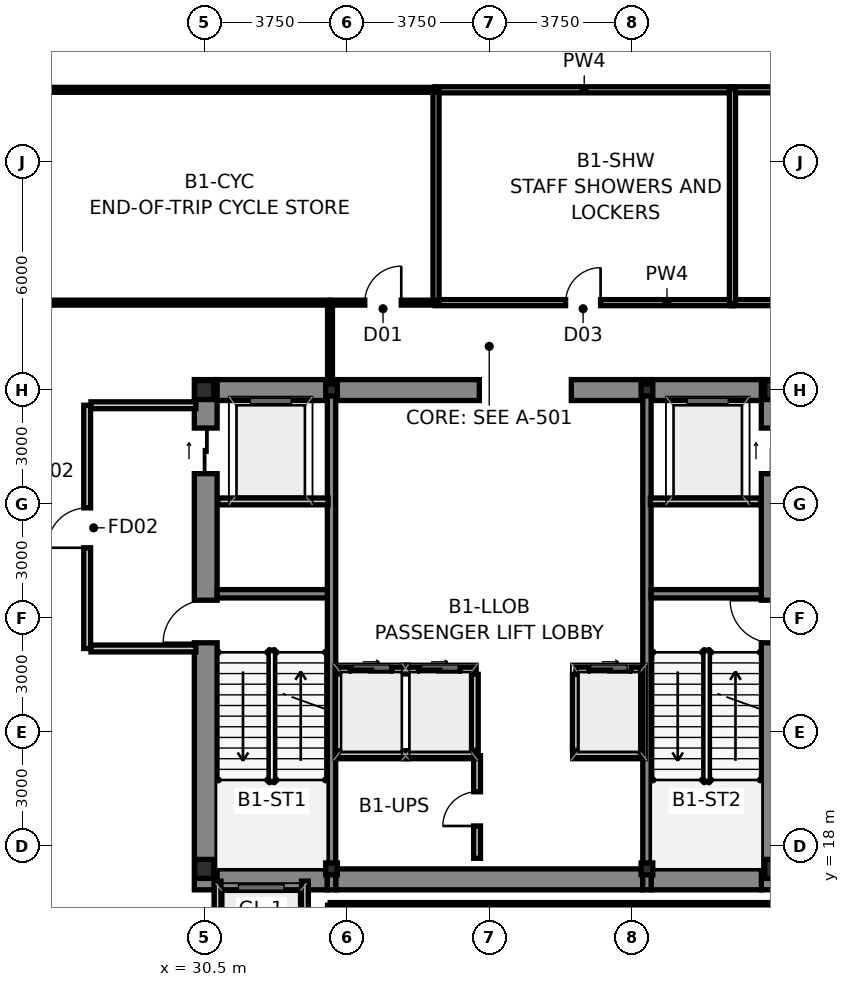
"""IFC4 building model, lengths in metres.
Left out: names, types, materials, properties, quantities, classifications, styles, units other than length and angle.
Written with IfcOpenShell. Run it as: python <this file> out.ifc"""

import sys

from ifc_helpers import new_model, si_unit, direction, frame, frame_2d, origin, origin_2d, place, context, subcontext, project, spatial, rectangle, i_section, extrude, source, transform, mapped, element, fill, save


model = new_model("IFC4")
c1 = context("Model", 3, precision=1e-05, world=origin(), true_north=direction((0.0, 1.0)))
c2 = subcontext(c1, "Body", "Model", "MODEL_VIEW")
j1 = project(units=[si_unit("LENGTHUNIT", "METRE"), si_unit("PLANEANGLEUNIT", "RADIAN")], contexts=[c1])
p1 = place(None, origin())
s1 = spatial("IfcSite", under=j1, at=p1, CompositionType="ELEMENT")
p2 = place(p1, origin())
s2 = spatial("IfcBuilding", under=s1, at=p2, CompositionType="ELEMENT")
p3 = place(p2, frame((0.0, 0.0, -4.8)))
s3 = spatial("IfcBuildingStorey", under=s2, at=p3, CompositionType="ELEMENT", Elevation=-4.8)
m1 = source(origin(), c2, "Body", "SweptSolid", [
    extrude(i_section(OverallWidth=0.5, OverallDepth=0.5, WebThickness=0.028, FlangeThickness=0.04, at=origin_2d()), origin(), (0.0, 0.0, 1.0), 4.8),
])
for number, where, z_axis, x_axis in (
    (1, (30.5, 17.4, 0.0), (0.0, 0.0, 1.0), (1.0, 0.0, 0.0)),
    (2, (45.5, 17.4, 0.0), (0.0, 0.0, 1.0), (1.0, 0.0, 0.0)),
    (3, (45.5, 30.0, 0.0), (0.0, 0.0, 1.0), (1.0, 0.0, 0.0)),
    (4, (30.5, 30.0, 0.0), (0.0, 0.0, 1.0), (1.0, 0.0, 0.0)),
):
    element("IfcColumn", number, at=place(p3, frame(where, z_axis=z_axis, x_axis=x_axis)), inside=s3, PredefinedType="COLUMN", context=c2, shape_type="MappedRepresentation", body=[
        mapped(m1, transform((0.0, 0.0, 0.0), scale=1.0)),
    ])
m2 = source(origin(), c2, "Body", "SweptSolid", [
    extrude(i_section(OverallWidth=0.307, OverallDepth=0.315, WebThickness=0.012, FlangeThickness=0.019, at=origin_2d()), origin(), (0.0, 0.0, 1.0), 4.8),
])
for number, where, z_axis, x_axis in (
    (5, (33.85, 17.4, 0.0), (0.0, 0.0, 1.0), (1.0, 0.0, 0.0)),
    (6, (42.15, 17.4, 0.0), (0.0, 0.0, 1.0), (1.0, 0.0, 0.0)),
    (7, (33.85, 30.0, 0.0), (0.0, 0.0, 1.0), (1.0, 0.0, 0.0)),
    (8, (42.15, 30.0, 0.0), (0.0, 0.0, 1.0), (1.0, 0.0, 0.0)),
):
    element("IfcColumn", number, at=place(p3, frame(where, z_axis=z_axis, x_axis=x_axis)), inside=s3, PredefinedType="COLUMN", context=c2, shape_type="MappedRepresentation", body=[
        mapped(m2, transform((0.0, 0.0, 0.0), scale=1.0)),
    ])
p4 = place(p3, frame((30.54, 16.85, 0.0), z_axis=(0.0, 0.0, 1.0), x_axis=(0.0, 1.0, 0.0)))
e9 = element("IfcWall", 9, at=p4, inside=s3, PredefinedType="SHEAR", context=c2, shape_type="SweptSolid", body=[
    extrude(rectangle(XDim=13.425, YDim=0.6, at=frame_2d((6.712, 0.0))), origin(), (0.0, 0.0, 1.0), 4.8),
])
p5 = place(p4, frame((6.5, 0.0, 0.0)))
e10 = element("IfcOpeningElement", 10, at=p5, cuts=e9, PredefinedType="OPENING", context=c2, shape_type="SweptSolid", body=[
    extrude(rectangle(XDim=1.12, YDim=2.15, at=frame_2d((0.56, 1.075))), frame((0.0, 0.312, 0.0), z_axis=(0.0, -1.0, 0.0), x_axis=(1.0, 0.0, 0.0)), (0.0, 0.0, 1.0), 0.624),
])
p6 = place(p4, frame((10.95, 0.0, 0.0)))
e11 = element("IfcOpeningElement", 11, at=p6, cuts=e9, PredefinedType="OPENING", context=c2, shape_type="SweptSolid", body=[
    extrude(rectangle(XDim=1.2, YDim=2.2, at=frame_2d((0.6, 1.1))), frame((0.0, 0.312, 0.0), z_axis=(0.0, -1.0, 0.0), x_axis=(1.0, 0.0, 0.0)), (0.0, 0.0, 1.0), 0.624),
])
p7 = place(p3, frame((45.46, 16.85, 0.0), z_axis=(0.0, 0.0, 1.0), x_axis=(0.0, 1.0, 0.0)))
e12 = element("IfcWall", 12, at=p7, inside=s3, PredefinedType="SHEAR", context=c2, shape_type="SweptSolid", body=[
    extrude(rectangle(XDim=13.425, YDim=0.6, at=frame_2d((6.712, 0.0))), origin(), (0.0, 0.0, 1.0), 4.8),
])
p8 = place(p7, frame((6.5, 0.0, 0.0)))
e13 = element("IfcOpeningElement", 13, at=p8, cuts=e12, PredefinedType="OPENING", context=c2, shape_type="SweptSolid", body=[
    extrude(rectangle(XDim=1.12, YDim=2.15, at=frame_2d((0.56, 1.075))), frame((0.0, 0.312, 0.0), z_axis=(0.0, -1.0, 0.0), x_axis=(1.0, 0.0, 0.0)), (0.0, 0.0, 1.0), 0.624),
])
p9 = place(p7, frame((10.95, 0.0, 0.0)))
e14 = element("IfcOpeningElement", 14, at=p9, cuts=e12, PredefinedType="OPENING", context=c2, shape_type="SweptSolid", body=[
    extrude(rectangle(XDim=1.2, YDim=2.2, at=frame_2d((0.6, 1.1))), frame((0.0, 0.312, 0.0), z_axis=(0.0, -1.0, 0.0), x_axis=(1.0, 0.0, 0.0)), (0.0, 0.0, 1.0), 0.624),
])
p10 = place(p3, frame((30.84, 17.125, 0.0), z_axis=(0.0, 0.0, 1.0), x_axis=(1.0, 0.0, 0.0)))
e15 = element("IfcWall", 15, at=p10, inside=s3, PredefinedType="SHEAR", context=c2, shape_type="SweptSolid", body=[
    extrude(rectangle(XDim=2.9, YDim=0.55, at=frame_2d((1.45, 0.0))), origin(), (0.0, 0.0, 1.0), 4.8),
])
p11 = place(p3, frame((33.96, 17.125, 0.0), z_axis=(0.0, 0.0, 1.0), x_axis=(1.0, 0.0, 0.0)))
e16 = element("IfcWall", 16, at=p11, inside=s3, PredefinedType="SHEAR", context=c2, shape_type="SweptSolid", body=[
    extrude(rectangle(XDim=8.08, YDim=0.55, at=frame_2d((4.04, 0.0))), origin(), (0.0, 0.0, 1.0), 4.8),
])
for number, where, z_axis, x_axis in (
    (17, (42.26, 17.125, 0.0), (0.0, 0.0, 1.0), (1.0, 0.0, 0.0)),
    (18, (30.84, 30.0, 0.0), (0.0, 0.0, 1.0), (1.0, 0.0, 0.0)),
):
    element("IfcWall", number, at=place(p3, frame(where, z_axis=z_axis, x_axis=x_axis)), inside=s3, PredefinedType="SHEAR", context=c2, shape_type="SweptSolid", body=[
        extrude(rectangle(XDim=2.9, YDim=0.55, at=frame_2d((1.45, 0.0))), origin(), (0.0, 0.0, 1.0), 4.8),
    ])
p12 = place(p3, frame((33.96, 30.0, 0.0), z_axis=(0.0, 0.0, 1.0), x_axis=(1.0, 0.0, 0.0)))
e19 = element("IfcWall", 19, at=p12, inside=s3, PredefinedType="SHEAR", context=c2, shape_type="SweptSolid", body=[
    extrude(rectangle(XDim=3.78, YDim=0.55, at=frame_2d((1.89, 0.0))), origin(), (0.0, 0.0, 1.0), 4.8),
])
p13 = place(p3, frame((40.16, 30.0, 0.0), z_axis=(0.0, 0.0, 1.0), x_axis=(1.0, 0.0, 0.0)))
e20 = element("IfcWall", 20, at=p13, inside=s3, PredefinedType="SHEAR", context=c2, shape_type="SweptSolid", body=[
    extrude(rectangle(XDim=1.88, YDim=0.55, at=frame_2d((0.94, 0.0))), origin(), (0.0, 0.0, 1.0), 4.8),
])
p14 = place(p3, frame((42.26, 30.0, 0.0), z_axis=(0.0, 0.0, 1.0), x_axis=(1.0, 0.0, 0.0)))
e21 = element("IfcWall", 21, at=p14, inside=s3, PredefinedType="SHEAR", context=c2, shape_type="SweptSolid", body=[
    extrude(rectangle(XDim=2.9, YDim=0.55, at=frame_2d((1.45, 0.0))), origin(), (0.0, 0.0, 1.0), 4.8),
])
for number, where, z_axis, x_axis in (
    (22, (33.85, 16.85, 0.0), (0.0, 0.0, 1.0), (0.0, 1.0, 0.0)),
    (23, (42.15, 16.85, 0.0), (0.0, 0.0, 1.0), (0.0, 1.0, 0.0)),
):
    element("IfcWall", number, at=place(p3, frame(where, z_axis=z_axis, x_axis=x_axis)), inside=s3, PredefinedType="SHEAR", context=c2, shape_type="SweptSolid", body=[
        extrude(rectangle(XDim=13.425, YDim=0.22, at=frame_2d((6.712, 0.0))), origin(), (0.0, 0.0, 1.0), 4.8),
    ])
for number, where, z_axis, x_axis in (
    (24, (30.84, 24.64, 0.0), (0.0, 0.0, 1.0), (1.0, 0.0, 0.0)),
    (25, (42.26, 24.64, 0.0), (0.0, 0.0, 1.0), (1.0, 0.0, 0.0)),
):
    element("IfcWall", number, at=place(p3, frame(where, z_axis=z_axis, x_axis=x_axis)), inside=s3, PredefinedType="SHEAR", context=c2, shape_type="SweptSolid", body=[
        extrude(rectangle(XDim=2.9, YDim=0.22, at=frame_2d((1.45, 0.0))), origin(), (0.0, 0.0, 1.0), 4.8),
    ])
p15 = place(p3, frame((30.85, 14.42, 0.0), z_axis=(0.0, 0.0, 1.0), x_axis=(0.0, 1.0, 0.0)))
e26 = element("IfcWall", 26, at=p15, inside=s3, PredefinedType="PARTITIONING", context=c2, shape_type="SweptSolid", body=[
    extrude(rectangle(XDim=2.66, YDim=0.18, at=frame_2d((1.33, 0.0))), origin(), (0.0, 0.0, 1.0), 3.854),
])
p16 = place(p3, frame((33.15, 14.42, 0.0), z_axis=(0.0, 0.0, 1.0), x_axis=(0.0, 1.0, 0.0)))
e27 = element("IfcWall", 27, at=p16, inside=s3, PredefinedType="PARTITIONING", context=c2, shape_type="SweptSolid", body=[
    extrude(rectangle(XDim=2.66, YDim=0.18, at=frame_2d((1.33, 0.0))), origin(), (0.0, 0.0, 1.0), 4.48),
])
p17 = place(p3, frame((34.02, 22.62, 0.0), z_axis=(0.0, 0.0, 1.0), x_axis=(1.0, 0.0, 0.0)))
e28 = element("IfcWall", 28, at=p17, inside=s3, PredefinedType="PARTITIONING", context=c2, shape_type="SweptSolid", body=[
    extrude(rectangle(XDim=3.6, YDim=0.18, at=frame_2d((1.8, 0.0))), origin(), (0.0, 0.0, 1.0), 4.48),
])
p18 = place(p17, frame((0.32, 0.0, 0.0)))
e29 = element("IfcOpeningElement", 29, at=p18, cuts=e28, PredefinedType="OPENING", context=c2, shape_type="SweptSolid", body=[
    extrude(rectangle(XDim=1.1, YDim=2.2, at=frame_2d((0.55, 1.1))), frame((0.0, 0.102, 0.0), z_axis=(0.0, -1.0, 0.0), x_axis=(1.0, 0.0, 0.0)), (0.0, 0.0, 1.0), 0.204),
])
p19 = place(p17, frame((2.12, 0.0, 0.0)))
e30 = element("IfcOpeningElement", 30, at=p19, cuts=e28, PredefinedType="OPENING", context=c2, shape_type="SweptSolid", body=[
    extrude(rectangle(XDim=1.1, YDim=2.2, at=frame_2d((0.55, 1.1))), frame((0.0, 0.102, 0.0), z_axis=(0.0, -1.0, 0.0), x_axis=(1.0, 0.0, 0.0)), (0.0, 0.0, 1.0), 0.204),
])
p20 = place(p3, frame((40.28, 22.62, 0.0), z_axis=(0.0, 0.0, 1.0), x_axis=(1.0, 0.0, 0.0)))
e31 = element("IfcWall", 31, at=p20, inside=s3, PredefinedType="PARTITIONING", context=c2, shape_type="SweptSolid", body=[
    extrude(rectangle(XDim=1.7, YDim=0.18, at=frame_2d((0.85, 0.0))), origin(), (0.0, 0.0, 1.0), 4.48),
])
p21 = place(p20, frame((0.35, 0.0, 0.0)))
e32 = element("IfcOpeningElement", 32, at=p21, cuts=e31, PredefinedType="OPENING", context=c2, shape_type="SweptSolid", body=[
    extrude(rectangle(XDim=1.1, YDim=2.2, at=frame_2d((0.55, 1.1))), frame((0.0, 0.102, 0.0), z_axis=(0.0, -1.0, 0.0), x_axis=(1.0, 0.0, 0.0)), (0.0, 0.0, 1.0), 0.204),
])
for number, where, z_axis, x_axis in (
    (33, (37.62, 20.52, 0.0), (0.0, 0.0, 1.0), (0.0, 1.0, 0.0)),
    (34, (40.28, 20.52, 0.0), (0.0, 0.0, 1.0), (0.0, 1.0, 0.0)),
):
    element("IfcWall", number, at=place(p3, frame(where, z_axis=z_axis, x_axis=x_axis)), inside=s3, PredefinedType="PARTITIONING", context=c2, shape_type="SweptSolid", body=[
        extrude(rectangle(XDim=2.0, YDim=0.18, at=frame_2d((1.0, 0.0))), origin(), (0.0, 0.0, 1.0), 4.48),
    ])
p22 = place(p3, frame((27.42, 23.2, 0.0), z_axis=(0.0, 0.0, 1.0), x_axis=(0.0, 1.0, 0.0)))
e35 = element("IfcWall", 35, at=p22, inside=s3, PredefinedType="PARTITIONING", context=c2, shape_type="SweptSolid", body=[
    extrude(rectangle(XDim=6.4, YDim=0.18, at=frame_2d((3.2, 0.0))), origin(), (0.0, 0.0, 1.0), 4.106),
])
p23 = place(p22, frame((2.65, 0.0, 0.0)))
e36 = element("IfcOpeningElement", 36, at=p23, cuts=e35, PredefinedType="OPENING", context=c2, shape_type="SweptSolid", body=[
    extrude(rectangle(XDim=1.05, YDim=2.15, at=frame_2d((0.525, 1.075))), frame((0.0, 0.102, 0.0), z_axis=(0.0, -1.0, 0.0), x_axis=(1.0, 0.0, 0.0)), (0.0, 0.0, 1.0), 0.204),
])
p24 = place(p3, frame((27.52, 23.2, 0.0), z_axis=(0.0, 0.0, 1.0), x_axis=(1.0, 0.0, 0.0)))
e37 = element("IfcWall", 37, at=p24, inside=s3, PredefinedType="PARTITIONING", context=c2, shape_type="SweptSolid", body=[
    extrude(rectangle(XDim=2.76, YDim=0.18, at=frame_2d((1.38, 0.0))), origin(), (0.0, 0.0, 1.0), 4.48),
])
p25 = place(p3, frame((27.52, 29.6, 0.0), z_axis=(0.0, 0.0, 1.0), x_axis=(1.0, 0.0, 0.0)))
e38 = element("IfcWall", 38, at=p25, inside=s3, PredefinedType="PARTITIONING", context=c2, shape_type="SweptSolid", body=[
    extrude(rectangle(XDim=2.76, YDim=0.18, at=frame_2d((1.38, 0.0))), origin(), (0.0, 0.0, 1.0), 3.854),
])
for number, where, z_axis, x_axis in (
    (39, (30.86, 27.07, 0.0), (0.0, 0.0, 1.0), (1.0, 0.0, 0.0)),
    (40, (42.24, 27.07, 0.0), (0.0, 0.0, 1.0), (1.0, 0.0, 0.0)),
):
    element("IfcWall", number, at=place(p3, frame(where, z_axis=z_axis, x_axis=x_axis)), inside=s3, PredefinedType="PARTITIONING", context=c2, shape_type="SweptSolid", body=[
        extrude(rectangle(XDim=2.9, YDim=0.18, at=frame_2d((1.45, 0.0))), origin(), (0.0, 0.0, 1.0), 4.48),
    ])
p26 = place(p3, frame((34.02, 20.42, 0.0), z_axis=(0.0, 0.0, 1.0), x_axis=(1.0, 0.0, 0.0)))
e41 = element("IfcWall", 41, at=p26, inside=s3, PredefinedType="PARTITIONING", context=c2, shape_type="SweptSolid", body=[
    extrude(rectangle(XDim=3.64, YDim=0.18, at=frame_2d((1.82, 0.0))), origin(), (0.0, 0.0, 1.0), 4.48),
])
p27 = place(p3, frame((40.22, 20.42, 0.0), z_axis=(0.0, 0.0, 1.0), x_axis=(1.0, 0.0, 0.0)))
e42 = element("IfcWall", 42, at=p27, inside=s3, PredefinedType="PARTITIONING", context=c2, shape_type="SweptSolid", body=[
    extrude(rectangle(XDim=1.76, YDim=0.18, at=frame_2d((0.88, 0.0))), origin(), (0.0, 0.0, 1.0), 4.48),
])
p28 = place(p3, frame((37.68, 17.68, 0.0), z_axis=(0.0, 0.0, 1.0), x_axis=(0.0, 1.0, 0.0)))
e43 = element("IfcWall", 43, at=p28, inside=s3, PredefinedType="PARTITIONING", context=c2, shape_type="SweptSolid", body=[
    extrude(rectangle(XDim=2.7, YDim=0.18, at=frame_2d((1.35, 0.0))), origin(), (0.0, 0.0, 1.0), 4.48),
])
p29 = place(p28, frame((0.85, 0.0, 0.0)))
e44 = element("IfcOpeningElement", 44, at=p29, cuts=e43, PredefinedType="OPENING", context=c2, shape_type="SweptSolid", body=[
    extrude(rectangle(XDim=0.9, YDim=2.1, at=frame_2d((0.45, 1.05))), frame((0.0, 0.102, 0.0), z_axis=(0.0, -1.0, 0.0), x_axis=(1.0, 0.0, 0.0)), (0.0, 0.0, 1.0), 0.204),
])
p30 = place(p3, frame((36.575, 32.3, 0.0), z_axis=(0.0, 0.0, 1.0), x_axis=(1.0, 0.0, 0.0)))
e45 = element("IfcWall", 45, at=p30, inside=s3, PredefinedType="PLUMBINGWALL", context=c2, shape_type="SweptSolid", body=[
    extrude(rectangle(XDim=7.85, YDim=0.16, at=frame_2d((3.925, 0.0))), origin(), (0.0, 0.0, 1.0), 4.48),
])
p31 = place(p30, frame((3.435, 0.0, 0.0)))
e46 = element("IfcOpeningElement", 46, at=p31, cuts=e45, PredefinedType="OPENING", context=c2, shape_type="SweptSolid", body=[
    extrude(rectangle(XDim=0.92, YDim=2.1, at=frame_2d((0.46, 1.05))), frame((0.0, 0.092, 0.0), z_axis=(0.0, -1.0, 0.0), x_axis=(1.0, 0.0, 0.0)), (0.0, 0.0, 1.0), 0.184),
])
p32 = place(p3, frame((36.575, 37.9, 0.0), z_axis=(0.0, 0.0, 1.0), x_axis=(1.0, 0.0, 0.0)))
e47 = element("IfcWall", 47, at=p32, inside=s3, PredefinedType="PLUMBINGWALL", context=c2, shape_type="SweptSolid", body=[
    extrude(rectangle(XDim=7.85, YDim=0.16, at=frame_2d((3.925, 0.0))), origin(), (0.0, 0.0, 1.0), 4.48),
])
p33 = place(p3, frame((44.375, 32.3, 0.0), z_axis=(0.0, 0.0, 1.0), x_axis=(1.0, 0.0, 0.0)))
e48 = element("IfcWall", 48, at=p33, inside=s3, PredefinedType="PLUMBINGWALL", context=c2, shape_type="SweptSolid", body=[
    extrude(rectangle(XDim=6.45, YDim=0.16, at=frame_2d((3.225, 0.0))), origin(), (0.0, 0.0, 1.0), 4.48),
])
p34 = place(p33, frame((2.735, 0.0, 0.0)))
e49 = element("IfcOpeningElement", 49, at=p34, cuts=e48, PredefinedType="OPENING", context=c2, shape_type="SweptSolid", body=[
    extrude(rectangle(XDim=0.92, YDim=2.1, at=frame_2d((0.46, 1.05))), frame((0.0, 0.092, 0.0), z_axis=(0.0, -1.0, 0.0), x_axis=(1.0, 0.0, 0.0)), (0.0, 0.0, 1.0), 0.184),
])
p35 = place(p3, frame((44.375, 37.9, 0.0), z_axis=(0.0, 0.0, 1.0), x_axis=(1.0, 0.0, 0.0)))
e50 = element("IfcWall", 50, at=p35, inside=s3, PredefinedType="PLUMBINGWALL", context=c2, shape_type="SweptSolid", body=[
    extrude(rectangle(XDim=6.45, YDim=0.16, at=frame_2d((3.225, 0.0))), origin(), (0.0, 0.0, 1.0), 4.48),
])
for number, where, z_axis, x_axis in (
    (51, (36.6, 32.275, 0.0), (0.0, 0.0, 1.0), (0.0, 1.0, 0.0)),
    (52, (44.4, 32.275, 0.0), (0.0, 0.0, 1.0), (0.0, 1.0, 0.0)),
):
    element("IfcWall", number, at=place(p3, frame(where, z_axis=z_axis, x_axis=x_axis)), inside=s3, PredefinedType="PLUMBINGWALL", context=c2, shape_type="SweptSolid", body=[
        extrude(rectangle(XDim=5.65, YDim=0.16, at=frame_2d((2.825, 0.0))), origin(), (0.0, 0.0, 1.0), 4.48),
    ])
p36 = place(p3, frame((48.58, 16.45, 0.0), z_axis=(0.0, 0.0, 1.0), x_axis=(-1.0, 0.0, 0.0)))
e53 = element("IfcWall", 53, at=p36, inside=s3, PredefinedType="PARTITIONING", context=c2, shape_type="SweptSolid", body=[
    extrude(rectangle(XDim=14.765, YDim=0.13, at=frame_2d((7.383, 0.0))), origin(), (0.0, 0.0, 1.0), 4.48),
])
p37 = place(p3, frame((25.205, 37.9, 0.0), z_axis=(0.0, 0.0, 1.0), x_axis=(1.0, 0.0, 0.0)))
e54 = element("IfcWall", 54, at=p37, inside=s3, PredefinedType="PARTITIONING", context=c2, shape_type="SweptSolid", body=[
    extrude(rectangle(XDim=11.39, YDim=0.13, at=frame_2d((5.695, 0.0))), origin(), (0.0, 0.0, 1.0), 4.48),
])
p38 = place(p3, frame((25.205, 32.3, 0.0), z_axis=(0.0, 0.0, 1.0), x_axis=(1.0, 0.0, 0.0)))
e55 = element("IfcWall", 55, at=p38, inside=s3, PredefinedType="PARTITIONING", context=c2, shape_type="SweptSolid", body=[
    extrude(rectangle(XDim=8.6, YDim=0.13, at=frame_2d((4.3, 0.0))), origin(), (0.0, 0.0, 1.0), 4.48),
])
p39 = place(p3, frame((33.815, 32.3, 0.0), z_axis=(0.0, 0.0, 1.0), x_axis=(1.0, 0.0, 0.0)))
e56 = element("IfcWall", 56, at=p39, inside=s3, PredefinedType="PARTITIONING", context=c2, shape_type="SweptSolid", body=[
    extrude(rectangle(XDim=2.78, YDim=0.13, at=frame_2d((1.39, 0.0))), origin(), (0.0, 0.0, 1.0), 4.48),
])
p40 = place(p39, frame((0.91, 0.0, 0.0)))
e57 = element("IfcOpeningElement", 57, at=p40, cuts=e56, PredefinedType="OPENING", context=c2, shape_type="SweptSolid", body=[
    extrude(rectangle(XDim=0.96, YDim=2.15, at=frame_2d((0.48, 1.075))), frame((0.0, 0.077, 0.0), z_axis=(0.0, -1.0, 0.0), x_axis=(1.0, 0.0, 0.0)), (0.0, 0.0, 1.0), 0.154),
])
p41 = place(p3, frame((33.81, 16.445, 0.0), z_axis=(0.0, 0.0, 1.0), x_axis=(0.0, -1.0, 0.0)))
e58 = element("IfcWall", 58, at=p41, inside=s3, PredefinedType="PARTITIONING", context=c2, shape_type="SweptSolid", body=[
    extrude(rectangle(XDim=2.19, YDim=0.13, at=frame_2d((1.095, 0.0))), origin(), (0.0, 0.0, 1.0), 4.48),
])
p42 = place(p3, frame((33.81, 32.295, 0.0), z_axis=(0.0, 0.0, 1.0), x_axis=(0.0, -1.0, 0.0)))
e59 = element("IfcWall", 59, at=p42, inside=s3, PredefinedType="PARTITIONING", context=c2, shape_type="SweptSolid", body=[
    extrude(rectangle(XDim=2.12, YDim=0.13, at=frame_2d((1.06, 0.0))), origin(), (0.0, 0.0, 1.0), 4.48),
])
p43 = place(p5, origin())
e60 = element("IfcDoor", 60, at=p43, inside=s3, OperationType="SINGLE_SWING_LEFT", PredefinedType="DOOR", context=c2, shape_type="SweptSolid", body=[
    extrude(rectangle(XDim=1.12, YDim=2.15, at=frame_2d((0.56, 1.075))), frame((0.0, 0.025, 0.0), z_axis=(0.0, -1.0, 0.0), x_axis=(1.0, 0.0, 0.0)), (0.0, 0.0, 1.0), 0.05),
])
fill(e10, e60)
p44 = place(p6, origin())
e61 = element("IfcDoor", 61, at=p44, inside=s3, OperationType="SLIDING_TO_LEFT", PredefinedType="DOOR", context=c2, shape_type="SweptSolid", body=[
    extrude(rectangle(XDim=1.2, YDim=2.2, at=frame_2d((0.6, 1.1))), frame((0.0, 0.025, 0.0), z_axis=(0.0, -1.0, 0.0), x_axis=(1.0, 0.0, 0.0)), (0.0, 0.0, 1.0), 0.05),
])
fill(e11, e61)
p45 = place(p18, origin())
e62 = element("IfcDoor", 62, at=p45, inside=s3, OperationType="SLIDING_TO_LEFT", PredefinedType="DOOR", context=c2, shape_type="SweptSolid", body=[
    extrude(rectangle(XDim=1.1, YDim=2.2, at=frame_2d((0.55, 1.1))), frame((0.0, 0.025, 0.0), z_axis=(0.0, -1.0, 0.0), x_axis=(1.0, 0.0, 0.0)), (0.0, 0.0, 1.0), 0.05),
])
fill(e29, e62)
p46 = place(p19, origin())
e63 = element("IfcDoor", 63, at=p46, inside=s3, OperationType="SLIDING_TO_RIGHT", PredefinedType="DOOR", context=c2, shape_type="SweptSolid", body=[
    extrude(rectangle(XDim=1.1, YDim=2.2, at=frame_2d((0.55, 1.1))), frame((0.0, 0.025, 0.0), z_axis=(0.0, -1.0, 0.0), x_axis=(1.0, 0.0, 0.0)), (0.0, 0.0, 1.0), 0.05),
])
fill(e30, e63)
p47 = place(p21, origin())
e64 = element("IfcDoor", 64, at=p47, inside=s3, OperationType="SLIDING_TO_LEFT", PredefinedType="DOOR", context=c2, shape_type="SweptSolid", body=[
    extrude(rectangle(XDim=1.1, YDim=2.2, at=frame_2d((0.55, 1.1))), frame((0.0, 0.025, 0.0), z_axis=(0.0, -1.0, 0.0), x_axis=(1.0, 0.0, 0.0)), (0.0, 0.0, 1.0), 0.05),
])
fill(e32, e64)
p48 = place(p23, origin())
e65 = element("IfcDoor", 65, at=p48, inside=s3, OperationType="SINGLE_SWING_LEFT", PredefinedType="DOOR", context=c2, shape_type="SweptSolid", body=[
    extrude(rectangle(XDim=1.05, YDim=2.15, at=frame_2d((0.525, 1.075))), frame((0.0, 0.025, 0.0), z_axis=(0.0, -1.0, 0.0), x_axis=(1.0, 0.0, 0.0)), (0.0, 0.0, 1.0), 0.05),
])
fill(e36, e65)
p49 = place(p29, origin())
e66 = element("IfcDoor", 66, at=p49, inside=s3, OperationType="SINGLE_SWING_LEFT", PredefinedType="DOOR", context=c2, shape_type="SweptSolid", body=[
    extrude(rectangle(XDim=0.9, YDim=2.1, at=frame_2d((0.45, 1.05))), frame((0.0, 0.025, 0.0), z_axis=(0.0, -1.0, 0.0), x_axis=(1.0, 0.0, 0.0)), (0.0, 0.0, 1.0), 0.05),
])
fill(e44, e66)
p50 = place(p31, origin())
e67 = element("IfcDoor", 67, at=p50, inside=s3, OperationType="SINGLE_SWING_RIGHT", PredefinedType="DOOR", context=c2, shape_type="SweptSolid", body=[
    extrude(rectangle(XDim=0.92, YDim=2.1, at=frame_2d((0.46, 1.05))), frame((0.0, 0.025, 0.0), z_axis=(0.0, -1.0, 0.0), x_axis=(1.0, 0.0, 0.0)), (0.0, 0.0, 1.0), 0.05),
])
fill(e46, e67)
p51 = place(p40, origin())
e68 = element("IfcDoor", 68, at=p51, inside=s3, OperationType="SINGLE_SWING_RIGHT", PredefinedType="DOOR", context=c2, shape_type="SweptSolid", body=[
    extrude(rectangle(XDim=0.96, YDim=2.15, at=frame_2d((0.48, 1.075))), frame((0.0, 0.025, 0.0), z_axis=(0.0, -1.0, 0.0), x_axis=(1.0, 0.0, 0.0)), (0.0, 0.0, 1.0), 0.05),
])
fill(e57, e68)
save(model, sys.argv[1])
